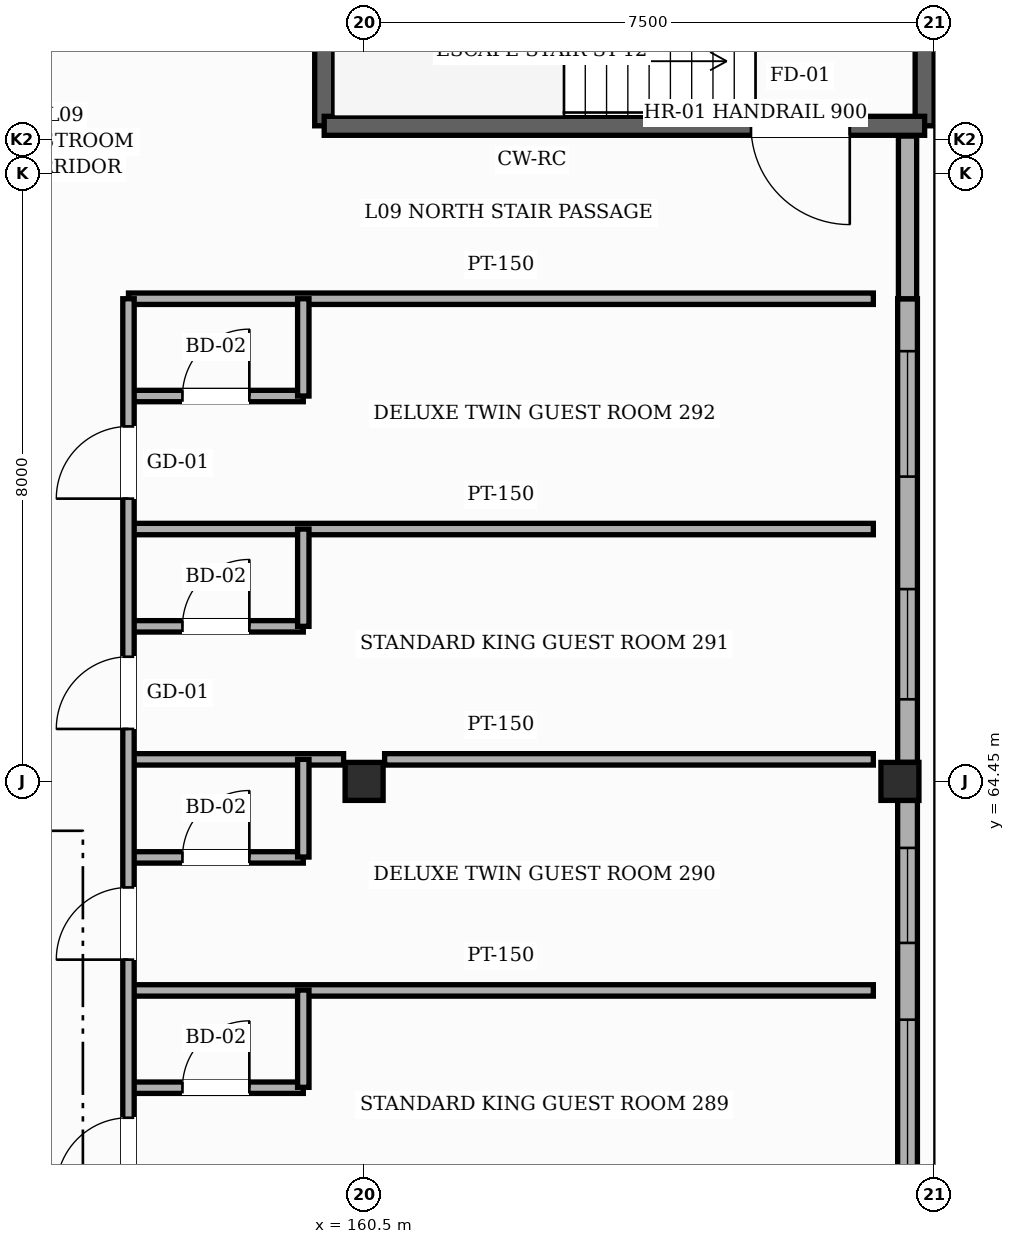
"""IFC4 building model, lengths in metres.
Left out: names, types, materials, properties, quantities, classifications, styles, units other than length and angle.
Written with IfcOpenShell. Run it as: python <this file> out.ifc"""

import sys

from ifc_helpers import new_model, si_unit, direction, frame, frame_2d, origin, origin_2d, place, context, subcontext, project, spatial, rectangle, hollow_rectangle, extrude, element, fill, save


model = new_model("IFC4")
c1 = context("Model", 3, precision=1e-05, world=origin(), true_north=direction((0.0, 1.0)))
c2 = subcontext(c1, "Body", "Model", "MODEL_VIEW")
j1 = project(units=[si_unit("LENGTHUNIT", "METRE"), si_unit("PLANEANGLEUNIT", "RADIAN")], contexts=[c1])
p1 = place(None, origin())
s1 = spatial("IfcSite", under=j1, at=p1, CompositionType="ELEMENT")
p2 = place(p1, origin())
s2 = spatial("IfcBuilding", under=s1, at=p2, CompositionType="ELEMENT")
p3 = place(p2, frame((0.0, 0.0, 39.0)))
s3 = spatial("IfcBuildingStorey", under=s2, at=p3, CompositionType="ELEMENT", Elevation=39.0)
for number, where, z_axis, x_axis in (
    (1, (160.5, 64.45, 0.0), (0.0, 0.0, 1.0), (1.0, 0.0, 0.0)),
    (2, (167.55, 64.45, 0.0), (0.0, 0.0, 1.0), (1.0, 0.0, 0.0)),
):
    element("IfcColumn", number, at=place(p3, frame(where, z_axis=z_axis, x_axis=x_axis)), inside=s3, PredefinedType="COLUMN", context=c2, shape_type="SweptSolid", body=[
        extrude(hollow_rectangle(XDim=0.5, YDim=0.5, WallThickness=0.022, InnerFilletRadius=0.022, OuterFilletRadius=0.044, at=origin_2d()), origin(), (0.0, 0.0, 1.0), 3.6),
    ])
p4 = place(p3, frame((167.65, 64.2, 0.0), z_axis=(0.0, 0.0, 1.0), x_axis=(0.0, -1.0, 0.0)))
e3 = element("IfcWall", 3, at=p4, inside=s3, PredefinedType="SOLIDWALL", context=c2, shape_type="SweptSolid", body=[
    extrude(rectangle(XDim=7.5, YDim=0.26, at=frame_2d((3.75, 0.0))), origin(), (0.0, 0.0, 1.0), 2.755),
])
p5 = place(p4, frame((6.09, 0.0, 0.85)))
e4 = element("IfcOpeningElement", 4, at=p5, cuts=e3, PredefinedType="OPENING", context=c2, shape_type="SweptSolid", body=[
    extrude(rectangle(XDim=0.85, YDim=1.35, at=frame_2d((0.425, 0.675))), frame((0.0, 0.14, 0.0), z_axis=(0.0, -1.0, 0.0), x_axis=(1.0, 0.0, 0.0)), (0.0, 0.0, 1.0), 0.28),
])
p6 = place(p4, frame((2.885, 0.0, 0.85)))
e5 = element("IfcOpeningElement", 5, at=p6, cuts=e3, PredefinedType="OPENING", context=c2, shape_type="SweptSolid", body=[
    extrude(rectangle(XDim=2.25, YDim=1.35, at=frame_2d((1.125, 0.675))), frame((0.0, 0.14, 0.0), z_axis=(0.0, -1.0, 0.0), x_axis=(1.0, 0.0, 0.0)), (0.0, 0.0, 1.0), 0.28),
])
p7 = place(p4, frame((0.625, 0.0, 0.85)))
e6 = element("IfcOpeningElement", 6, at=p7, cuts=e3, PredefinedType="OPENING", context=c2, shape_type="SweptSolid", body=[
    extrude(rectangle(XDim=1.25, YDim=1.5, at=frame_2d((0.625, 0.75))), frame((0.0, 0.14, 0.0), z_axis=(0.0, -1.0, 0.0), x_axis=(1.0, 0.0, 0.0)), (0.0, 0.0, 1.0), 0.28),
])
p8 = place(p3, frame((167.65, 70.8, 0.0), z_axis=(0.0, 0.0, 1.0), x_axis=(0.0, -1.0, 0.0)))
e7 = element("IfcWall", 7, at=p8, inside=s3, PredefinedType="SOLIDWALL", context=c2, shape_type="SweptSolid", body=[
    extrude(rectangle(XDim=6.1, YDim=0.26, at=frame_2d((3.05, 0.0))), origin(), (0.0, 0.0, 1.0), 3.365),
])
p9 = place(p8, frame((3.82, 0.0, 0.85)))
e8 = element("IfcOpeningElement", 8, at=p9, cuts=e7, PredefinedType="OPENING", context=c2, shape_type="SweptSolid", body=[
    extrude(rectangle(XDim=1.45, YDim=1.5, at=frame_2d((0.725, 0.75))), frame((0.0, 0.14, 0.0), z_axis=(0.0, -1.0, 0.0), x_axis=(1.0, 0.0, 0.0)), (0.0, 0.0, 1.0), 0.28),
])
p10 = place(p8, frame((0.69, 0.0, 0.85)))
e9 = element("IfcOpeningElement", 9, at=p10, cuts=e7, PredefinedType="OPENING", context=c2, shape_type="SweptSolid", body=[
    extrude(rectangle(XDim=1.65, YDim=1.5, at=frame_2d((0.825, 0.75))), frame((0.0, 0.14, 0.0), z_axis=(0.0, -1.0, 0.0), x_axis=(1.0, 0.0, 0.0)), (0.0, 0.0, 1.0), 0.28),
])
p11 = place(p3, frame((167.65, 72.94, 0.0), z_axis=(0.0, 0.0, 1.0), x_axis=(0.0, -1.0, 0.0)))
e10 = element("IfcWall", 10, at=p11, inside=s3, PredefinedType="SOLIDWALL", context=c2, shape_type="SweptSolid", body=[
    extrude(rectangle(XDim=2.14, YDim=0.24, at=frame_2d((1.07, 0.0))), origin(), (0.0, 0.0, 1.0), 3.365),
])
for number, where, z_axis, x_axis in (
    (11, (167.875, 76.425, 0.0), (0.0, 0.0, 1.0), (0.0, -1.0, 0.0)),
    (12, (159.975, 73.075, 0.0), (0.0, 0.0, 1.0), (0.0, 1.0, 0.0)),
):
    element("IfcWall", number, at=place(p3, frame(where, z_axis=z_axis, x_axis=x_axis)), inside=s3, PredefinedType="SHEAR", context=c2, shape_type="SweptSolid", body=[
        extrude(rectangle(XDim=3.35, YDim=0.25, at=frame_2d((1.675, 0.0))), origin(), (0.0, 0.0, 1.0), 3.38),
    ])
p12 = place(p3, frame((167.875, 73.075, 0.0), z_axis=(0.0, 0.0, 1.0), x_axis=(-1.0, 0.0, 0.0)))
e13 = element("IfcWall", 13, at=p12, inside=s3, PredefinedType="SHEAR", context=c2, shape_type="SweptSolid", body=[
    extrude(rectangle(XDim=7.9, YDim=0.25, at=frame_2d((3.95, 0.0))), origin(), (0.0, 0.0, 1.0), 3.38),
])
p13 = place(p12, frame((0.985, 0.0, 0.0)))
e14 = element("IfcOpeningElement", 14, at=p13, cuts=e13, PredefinedType="OPENING", context=c2, shape_type="SweptSolid", body=[
    extrude(rectangle(XDim=1.3, YDim=2.2, at=frame_2d((0.65, 1.1))), frame((0.0, 0.135, 0.0), z_axis=(0.0, -1.0, 0.0), x_axis=(1.0, 0.0, 0.0)), (0.0, 0.0, 1.0), 0.27),
])
p14 = place(p3, frame((157.4, 60.42, 0.0), z_axis=(0.0, 0.0, 1.0), x_axis=(1.0, 0.0, 0.0)))
e15 = element("IfcWall", 15, at=p14, inside=s3, PredefinedType="PARTITIONING", context=c2, shape_type="SweptSolid", body=[
    extrude(rectangle(XDim=2.3, YDim=0.15, at=frame_2d((1.15, 0.0))), origin(), (0.0, 0.0, 1.0), 3.365),
])
p15 = place(p14, frame((0.71, 0.0, 0.0)))
e16 = element("IfcOpeningElement", 16, at=p15, cuts=e15, PredefinedType="OPENING", context=c2, shape_type="SweptSolid", body=[
    extrude(rectangle(XDim=0.88, YDim=2.12, at=frame_2d((0.44, 1.06))), frame((0.0, 0.085, 0.0), z_axis=(0.0, -1.0, 0.0), x_axis=(1.0, 0.0, 0.0)), (0.0, 0.0, 1.0), 0.17),
])
p16 = place(p3, frame((157.4, 61.7, 0.0), z_axis=(0.0, 0.0, 1.0), x_axis=(1.0, 0.0, 0.0)))
e17 = element("IfcWall", 17, at=p16, inside=s3, PredefinedType="PARTITIONING", context=c2, shape_type="SweptSolid", body=[
    extrude(rectangle(XDim=9.8, YDim=0.15, at=frame_2d((4.9, 0.0))), origin(), (0.0, 0.0, 1.0), 3.365),
])
p17 = place(p3, frame((157.4, 63.45, 0.0), z_axis=(0.0, 0.0, 1.0), x_axis=(1.0, 0.0, 0.0)))
e18 = element("IfcWall", 18, at=p17, inside=s3, PredefinedType="PARTITIONING", context=c2, shape_type="SweptSolid", body=[
    extrude(rectangle(XDim=2.3, YDim=0.15, at=frame_2d((1.15, 0.0))), origin(), (0.0, 0.0, 1.0), 3.365),
])
p18 = place(p17, frame((0.71, 0.0, 0.0)))
e19 = element("IfcOpeningElement", 19, at=p18, cuts=e18, PredefinedType="OPENING", context=c2, shape_type="SweptSolid", body=[
    extrude(rectangle(XDim=0.88, YDim=2.12, at=frame_2d((0.44, 1.06))), frame((0.0, 0.085, 0.0), z_axis=(0.0, -1.0, 0.0), x_axis=(1.0, 0.0, 0.0)), (0.0, 0.0, 1.0), 0.17),
])
p19 = place(p3, frame((157.4, 64.74, 0.0), z_axis=(0.0, 0.0, 1.0), x_axis=(1.0, 0.0, 0.0)))
e20 = element("IfcWall", 20, at=p19, inside=s3, PredefinedType="PARTITIONING", context=c2, shape_type="SweptSolid", body=[
    extrude(rectangle(XDim=2.83, YDim=0.15, at=frame_2d((1.415, 0.0))), origin(), (0.0, 0.0, 1.0), 2.755),
])
p20 = place(p3, frame((160.77, 64.74, 0.0), z_axis=(0.0, 0.0, 1.0), x_axis=(1.0, 0.0, 0.0)))
e21 = element("IfcWall", 21, at=p20, inside=s3, PredefinedType="PARTITIONING", context=c2, shape_type="SweptSolid", body=[
    extrude(rectangle(XDim=6.43, YDim=0.15, at=frame_2d((3.215, 0.0))), origin(), (0.0, 0.0, 1.0), 2.905),
])
p21 = place(p3, frame((157.4, 66.49, 0.0), z_axis=(0.0, 0.0, 1.0), x_axis=(1.0, 0.0, 0.0)))
e22 = element("IfcWall", 22, at=p21, inside=s3, PredefinedType="PARTITIONING", context=c2, shape_type="SweptSolid", body=[
    extrude(rectangle(XDim=2.3, YDim=0.15, at=frame_2d((1.15, 0.0))), origin(), (0.0, 0.0, 1.0), 3.365),
])
p22 = place(p21, frame((0.71, 0.0, 0.0)))
e23 = element("IfcOpeningElement", 23, at=p22, cuts=e22, PredefinedType="OPENING", context=c2, shape_type="SweptSolid", body=[
    extrude(rectangle(XDim=0.88, YDim=2.12, at=frame_2d((0.44, 1.06))), frame((0.0, 0.085, 0.0), z_axis=(0.0, -1.0, 0.0), x_axis=(1.0, 0.0, 0.0)), (0.0, 0.0, 1.0), 0.17),
])
p23 = place(p3, frame((157.4, 67.77, 0.0), z_axis=(0.0, 0.0, 1.0), x_axis=(1.0, 0.0, 0.0)))
e24 = element("IfcWall", 24, at=p23, inside=s3, PredefinedType="PARTITIONING", context=c2, shape_type="SweptSolid", body=[
    extrude(rectangle(XDim=9.8, YDim=0.15, at=frame_2d((4.9, 0.0))), origin(), (0.0, 0.0, 1.0), 3.365),
])
p24 = place(p3, frame((157.4, 69.52, 0.0), z_axis=(0.0, 0.0, 1.0), x_axis=(1.0, 0.0, 0.0)))
e25 = element("IfcWall", 25, at=p24, inside=s3, PredefinedType="PARTITIONING", context=c2, shape_type="SweptSolid", body=[
    extrude(rectangle(XDim=2.3, YDim=0.15, at=frame_2d((1.15, 0.0))), origin(), (0.0, 0.0, 1.0), 3.365),
])
p25 = place(p24, frame((0.71, 0.0, 0.0)))
e26 = element("IfcOpeningElement", 26, at=p25, cuts=e25, PredefinedType="OPENING", context=c2, shape_type="SweptSolid", body=[
    extrude(rectangle(XDim=0.88, YDim=2.12, at=frame_2d((0.44, 1.06))), frame((0.0, 0.085, 0.0), z_axis=(0.0, -1.0, 0.0), x_axis=(1.0, 0.0, 0.0)), (0.0, 0.0, 1.0), 0.17),
])
p26 = place(p3, frame((157.4, 70.8, 0.0), z_axis=(0.0, 0.0, 1.0), x_axis=(1.0, 0.0, 0.0)))
e27 = element("IfcWall", 27, at=p26, inside=s3, PredefinedType="PARTITIONING", context=c2, shape_type="SweptSolid", body=[
    extrude(rectangle(XDim=9.8, YDim=0.15, at=frame_2d((4.9, 0.0))), origin(), (0.0, 0.0, 1.0), 3.365),
])
p27 = place(p3, frame((157.4, 22.3, 0.0), z_axis=(0.0, 0.0, 1.0), x_axis=(0.0, 1.0, 0.0)))
e28 = element("IfcWall", 28, at=p27, inside=s3, PredefinedType="PARTITIONING", context=c2, shape_type="SweptSolid", body=[
    extrude(rectangle(XDim=48.5, YDim=0.15, at=frame_2d((24.25, 0.0))), origin(), (0.0, 0.0, 1.0), 3.365),
])
p28 = place(p27, frame((0.325, 0.0, 0.0)))
e29 = element("IfcOpeningElement", 29, at=p28, cuts=e28, PredefinedType="OPENING", context=c2, shape_type="SweptSolid", body=[
    extrude(rectangle(XDim=1.1, YDim=2.2, at=frame_2d((0.55, 1.1))), frame((0.0, 0.085, 0.0), z_axis=(0.0, -1.0, 0.0), x_axis=(1.0, 0.0, 0.0)), (0.0, 0.0, 1.0), 0.17),
])
p29 = place(p27, frame((3.43, 0.0, 0.0)))
e30 = element("IfcOpeningElement", 30, at=p29, cuts=e28, PredefinedType="OPENING", context=c2, shape_type="SweptSolid", body=[
    extrude(rectangle(XDim=0.95, YDim=2.15, at=frame_2d((0.475, 1.075))), frame((0.0, 0.085, 0.0), z_axis=(0.0, -1.0, 0.0), x_axis=(1.0, 0.0, 0.0)), (0.0, 0.0, 1.0), 0.17),
])
p30 = place(p27, frame((6.46, 0.0, 0.0)))
e31 = element("IfcOpeningElement", 31, at=p30, cuts=e28, PredefinedType="OPENING", context=c2, shape_type="SweptSolid", body=[
    extrude(rectangle(XDim=0.95, YDim=2.15, at=frame_2d((0.475, 1.075))), frame((0.0, 0.085, 0.0), z_axis=(0.0, -1.0, 0.0), x_axis=(1.0, 0.0, 0.0)), (0.0, 0.0, 1.0), 0.17),
])
p31 = place(p27, frame((9.495, 0.0, 0.0)))
e32 = element("IfcOpeningElement", 32, at=p31, cuts=e28, PredefinedType="OPENING", context=c2, shape_type="SweptSolid", body=[
    extrude(rectangle(XDim=0.95, YDim=2.15, at=frame_2d((0.475, 1.075))), frame((0.0, 0.085, 0.0), z_axis=(0.0, -1.0, 0.0), x_axis=(1.0, 0.0, 0.0)), (0.0, 0.0, 1.0), 0.17),
])
p32 = place(p27, frame((12.525, 0.0, 0.0)))
e33 = element("IfcOpeningElement", 33, at=p32, cuts=e28, PredefinedType="OPENING", context=c2, shape_type="SweptSolid", body=[
    extrude(rectangle(XDim=0.95, YDim=2.15, at=frame_2d((0.475, 1.075))), frame((0.0, 0.085, 0.0), z_axis=(0.0, -1.0, 0.0), x_axis=(1.0, 0.0, 0.0)), (0.0, 0.0, 1.0), 0.17),
])
p33 = place(p27, frame((15.555, 0.0, 0.0)))
e34 = element("IfcOpeningElement", 34, at=p33, cuts=e28, PredefinedType="OPENING", context=c2, shape_type="SweptSolid", body=[
    extrude(rectangle(XDim=0.95, YDim=2.15, at=frame_2d((0.475, 1.075))), frame((0.0, 0.085, 0.0), z_axis=(0.0, -1.0, 0.0), x_axis=(1.0, 0.0, 0.0)), (0.0, 0.0, 1.0), 0.17),
])
p34 = place(p27, frame((18.585, 0.0, 0.0)))
e35 = element("IfcOpeningElement", 35, at=p34, cuts=e28, PredefinedType="OPENING", context=c2, shape_type="SweptSolid", body=[
    extrude(rectangle(XDim=0.95, YDim=2.15, at=frame_2d((0.475, 1.075))), frame((0.0, 0.085, 0.0), z_axis=(0.0, -1.0, 0.0), x_axis=(1.0, 0.0, 0.0)), (0.0, 0.0, 1.0), 0.17),
])
p35 = place(p27, frame((21.62, 0.0, 0.0)))
e36 = element("IfcOpeningElement", 36, at=p35, cuts=e28, PredefinedType="OPENING", context=c2, shape_type="SweptSolid", body=[
    extrude(rectangle(XDim=0.95, YDim=2.15, at=frame_2d((0.475, 1.075))), frame((0.0, 0.085, 0.0), z_axis=(0.0, -1.0, 0.0), x_axis=(1.0, 0.0, 0.0)), (0.0, 0.0, 1.0), 0.17),
])
p36 = place(p27, frame((24.65, 0.0, 0.0)))
e37 = element("IfcOpeningElement", 37, at=p36, cuts=e28, PredefinedType="OPENING", context=c2, shape_type="SweptSolid", body=[
    extrude(rectangle(XDim=0.95, YDim=2.15, at=frame_2d((0.475, 1.075))), frame((0.0, 0.085, 0.0), z_axis=(0.0, -1.0, 0.0), x_axis=(1.0, 0.0, 0.0)), (0.0, 0.0, 1.0), 0.17),
])
p37 = place(p27, frame((27.68, 0.0, 0.0)))
e38 = element("IfcOpeningElement", 38, at=p37, cuts=e28, PredefinedType="OPENING", context=c2, shape_type="SweptSolid", body=[
    extrude(rectangle(XDim=0.95, YDim=2.15, at=frame_2d((0.475, 1.075))), frame((0.0, 0.085, 0.0), z_axis=(0.0, -1.0, 0.0), x_axis=(1.0, 0.0, 0.0)), (0.0, 0.0, 1.0), 0.17),
])
p38 = place(p27, frame((30.71, 0.0, 0.0)))
e39 = element("IfcOpeningElement", 39, at=p38, cuts=e28, PredefinedType="OPENING", context=c2, shape_type="SweptSolid", body=[
    extrude(rectangle(XDim=0.95, YDim=2.15, at=frame_2d((0.475, 1.075))), frame((0.0, 0.085, 0.0), z_axis=(0.0, -1.0, 0.0), x_axis=(1.0, 0.0, 0.0)), (0.0, 0.0, 1.0), 0.17),
])
p39 = place(p27, frame((33.745, 0.0, 0.0)))
e40 = element("IfcOpeningElement", 40, at=p39, cuts=e28, PredefinedType="OPENING", context=c2, shape_type="SweptSolid", body=[
    extrude(rectangle(XDim=0.95, YDim=2.15, at=frame_2d((0.475, 1.075))), frame((0.0, 0.085, 0.0), z_axis=(0.0, -1.0, 0.0), x_axis=(1.0, 0.0, 0.0)), (0.0, 0.0, 1.0), 0.17),
])
p40 = place(p27, frame((36.775, 0.0, 0.0)))
e41 = element("IfcOpeningElement", 41, at=p40, cuts=e28, PredefinedType="OPENING", context=c2, shape_type="SweptSolid", body=[
    extrude(rectangle(XDim=0.95, YDim=2.15, at=frame_2d((0.475, 1.075))), frame((0.0, 0.085, 0.0), z_axis=(0.0, -1.0, 0.0), x_axis=(1.0, 0.0, 0.0)), (0.0, 0.0, 1.0), 0.17),
])
p41 = place(p27, frame((39.805, 0.0, 0.0)))
e42 = element("IfcOpeningElement", 42, at=p41, cuts=e28, PredefinedType="OPENING", context=c2, shape_type="SweptSolid", body=[
    extrude(rectangle(XDim=0.95, YDim=2.15, at=frame_2d((0.475, 1.075))), frame((0.0, 0.085, 0.0), z_axis=(0.0, -1.0, 0.0), x_axis=(1.0, 0.0, 0.0)), (0.0, 0.0, 1.0), 0.17),
])
p42 = place(p27, frame((42.84, 0.0, 0.0)))
e43 = element("IfcOpeningElement", 43, at=p42, cuts=e28, PredefinedType="OPENING", context=c2, shape_type="SweptSolid", body=[
    extrude(rectangle(XDim=0.95, YDim=2.15, at=frame_2d((0.475, 1.075))), frame((0.0, 0.085, 0.0), z_axis=(0.0, -1.0, 0.0), x_axis=(1.0, 0.0, 0.0)), (0.0, 0.0, 1.0), 0.17),
])
p43 = place(p27, frame((45.87, 0.0, 0.0)))
e44 = element("IfcOpeningElement", 44, at=p43, cuts=e28, PredefinedType="OPENING", context=c2, shape_type="SweptSolid", body=[
    extrude(rectangle(XDim=0.95, YDim=2.15, at=frame_2d((0.475, 1.075))), frame((0.0, 0.085, 0.0), z_axis=(0.0, -1.0, 0.0), x_axis=(1.0, 0.0, 0.0)), (0.0, 0.0, 1.0), 0.17),
])
p44 = place(p3, frame((159.7, 60.425, 0.0), z_axis=(0.0, 0.0, 1.0), x_axis=(0.0, 1.0, 0.0)))
e45 = element("IfcWall", 45, at=p44, inside=s3, PredefinedType="PARTITIONING", context=c2, shape_type="SweptSolid", body=[
    extrude(rectangle(XDim=1.28, YDim=0.15, at=frame_2d((0.64, 0.0))), origin(), (0.0, 0.0, 1.0), 3.365),
])
p45 = place(p3, frame((159.7, 63.455, 0.0), z_axis=(0.0, 0.0, 1.0), x_axis=(0.0, 1.0, 0.0)))
e46 = element("IfcWall", 46, at=p45, inside=s3, PredefinedType="PARTITIONING", context=c2, shape_type="SweptSolid", body=[
    extrude(rectangle(XDim=1.285, YDim=0.15, at=frame_2d((0.643, 0.0))), origin(), (0.0, 0.0, 1.0), 3.365),
])
for number, where, z_axis, x_axis in (
    (47, (159.7, 66.49, 0.0), (0.0, 0.0, 1.0), (0.0, 1.0, 0.0)),
    (48, (159.7, 69.52, 0.0), (0.0, 0.0, 1.0), (0.0, 1.0, 0.0)),
):
    element("IfcWall", number, at=place(p3, frame(where, z_axis=z_axis, x_axis=x_axis)), inside=s3, PredefinedType="PARTITIONING", context=c2, shape_type="SweptSolid", body=[
        extrude(rectangle(XDim=1.28, YDim=0.15, at=frame_2d((0.64, 0.0))), origin(), (0.0, 0.0, 1.0), 3.365),
    ])
p46 = place(p6, origin())
e49 = element("IfcWindow", 49, at=p46, inside=s3, PartitioningType="SINGLE_PANEL", PredefinedType="WINDOW", context=c2, shape_type="SweptSolid", body=[
    extrude(rectangle(XDim=2.25, YDim=1.35, at=frame_2d((1.125, 0.675))), frame((0.0, 0.03, 0.0), z_axis=(0.0, -1.0, 0.0), x_axis=(1.0, 0.0, 0.0)), (0.0, 0.0, 1.0), 0.06),
])
fill(e5, e49)
p47 = place(p7, origin())
e50 = element("IfcWindow", 50, at=p47, inside=s3, PartitioningType="SINGLE_PANEL", PredefinedType="WINDOW", context=c2, shape_type="SweptSolid", body=[
    extrude(rectangle(XDim=1.25, YDim=1.5, at=frame_2d((0.625, 0.75))), frame((0.0, 0.03, 0.0), z_axis=(0.0, -1.0, 0.0), x_axis=(1.0, 0.0, 0.0)), (0.0, 0.0, 1.0), 0.06),
])
fill(e6, e50)
p48 = place(p9, origin())
e51 = element("IfcWindow", 51, at=p48, inside=s3, PartitioningType="SINGLE_PANEL", PredefinedType="WINDOW", context=c2, shape_type="SweptSolid", body=[
    extrude(rectangle(XDim=1.45, YDim=1.5, at=frame_2d((0.725, 0.75))), frame((0.0, 0.03, 0.0), z_axis=(0.0, -1.0, 0.0), x_axis=(1.0, 0.0, 0.0)), (0.0, 0.0, 1.0), 0.06),
])
fill(e8, e51)
p49 = place(p10, origin())
e52 = element("IfcWindow", 52, at=p49, inside=s3, PartitioningType="SINGLE_PANEL", PredefinedType="WINDOW", context=c2, shape_type="SweptSolid", body=[
    extrude(rectangle(XDim=1.65, YDim=1.5, at=frame_2d((0.825, 0.75))), frame((0.0, 0.03, 0.0), z_axis=(0.0, -1.0, 0.0), x_axis=(1.0, 0.0, 0.0)), (0.0, 0.0, 1.0), 0.06),
])
fill(e9, e52)
p50 = place(p13, origin())
e53 = element("IfcDoor", 53, at=p50, inside=s3, OperationType="SINGLE_SWING_LEFT", PredefinedType="DOOR", context=c2, shape_type="SweptSolid", body=[
    extrude(rectangle(XDim=1.3, YDim=2.2, at=frame_2d((0.65, 1.1))), frame((0.0, 0.025, 0.0), z_axis=(0.0, -1.0, 0.0), x_axis=(1.0, 0.0, 0.0)), (0.0, 0.0, 1.0), 0.05),
])
fill(e14, e53)
p51 = place(p40, origin())
e54 = element("IfcDoor", 54, at=p51, inside=s3, OperationType="SINGLE_SWING_LEFT", PredefinedType="DOOR", context=c2, shape_type="SweptSolid", body=[
    extrude(rectangle(XDim=0.95, YDim=2.15, at=frame_2d((0.475, 1.075))), frame((0.0, 0.025, 0.0), z_axis=(0.0, -1.0, 0.0), x_axis=(1.0, 0.0, 0.0)), (0.0, 0.0, 1.0), 0.05),
])
fill(e41, e54)
p52 = place(p15, origin())
e55 = element("IfcDoor", 55, at=p52, inside=s3, OperationType="SINGLE_SWING_RIGHT", PredefinedType="DOOR", context=c2, shape_type="SweptSolid", body=[
    extrude(rectangle(XDim=0.88, YDim=2.12, at=frame_2d((0.44, 1.06))), frame((0.0, 0.025, 0.0), z_axis=(0.0, -1.0, 0.0), x_axis=(1.0, 0.0, 0.0)), (0.0, 0.0, 1.0), 0.05),
])
fill(e16, e55)
p53 = place(p41, origin())
e56 = element("IfcDoor", 56, at=p53, inside=s3, OperationType="SINGLE_SWING_LEFT", PredefinedType="DOOR", context=c2, shape_type="SweptSolid", body=[
    extrude(rectangle(XDim=0.95, YDim=2.15, at=frame_2d((0.475, 1.075))), frame((0.0, 0.025, 0.0), z_axis=(0.0, -1.0, 0.0), x_axis=(1.0, 0.0, 0.0)), (0.0, 0.0, 1.0), 0.05),
])
fill(e42, e56)
p54 = place(p18, origin())
e57 = element("IfcDoor", 57, at=p54, inside=s3, OperationType="SINGLE_SWING_RIGHT", PredefinedType="DOOR", context=c2, shape_type="SweptSolid", body=[
    extrude(rectangle(XDim=0.88, YDim=2.12, at=frame_2d((0.44, 1.06))), frame((0.0, 0.025, 0.0), z_axis=(0.0, -1.0, 0.0), x_axis=(1.0, 0.0, 0.0)), (0.0, 0.0, 1.0), 0.05),
])
fill(e19, e57)
p55 = place(p42, origin())
e58 = element("IfcDoor", 58, at=p55, inside=s3, OperationType="SINGLE_SWING_LEFT", PredefinedType="DOOR", context=c2, shape_type="SweptSolid", body=[
    extrude(rectangle(XDim=0.95, YDim=2.15, at=frame_2d((0.475, 1.075))), frame((0.0, 0.025, 0.0), z_axis=(0.0, -1.0, 0.0), x_axis=(1.0, 0.0, 0.0)), (0.0, 0.0, 1.0), 0.05),
])
fill(e43, e58)
p56 = place(p22, origin())
e59 = element("IfcDoor", 59, at=p56, inside=s3, OperationType="SINGLE_SWING_RIGHT", PredefinedType="DOOR", context=c2, shape_type="SweptSolid", body=[
    extrude(rectangle(XDim=0.88, YDim=2.12, at=frame_2d((0.44, 1.06))), frame((0.0, 0.025, 0.0), z_axis=(0.0, -1.0, 0.0), x_axis=(1.0, 0.0, 0.0)), (0.0, 0.0, 1.0), 0.05),
])
fill(e23, e59)
p57 = place(p43, origin())
e60 = element("IfcDoor", 60, at=p57, inside=s3, OperationType="SINGLE_SWING_LEFT", PredefinedType="DOOR", context=c2, shape_type="SweptSolid", body=[
    extrude(rectangle(XDim=0.95, YDim=2.15, at=frame_2d((0.475, 1.075))), frame((0.0, 0.025, 0.0), z_axis=(0.0, -1.0, 0.0), x_axis=(1.0, 0.0, 0.0)), (0.0, 0.0, 1.0), 0.05),
])
fill(e44, e60)
p58 = place(p25, origin())
e61 = element("IfcDoor", 61, at=p58, inside=s3, OperationType="SINGLE_SWING_RIGHT", PredefinedType="DOOR", context=c2, shape_type="SweptSolid", body=[
    extrude(rectangle(XDim=0.88, YDim=2.12, at=frame_2d((0.44, 1.06))), frame((0.0, 0.025, 0.0), z_axis=(0.0, -1.0, 0.0), x_axis=(1.0, 0.0, 0.0)), (0.0, 0.0, 1.0), 0.05),
])
fill(e26, e61)
save(model, sys.argv[1])
